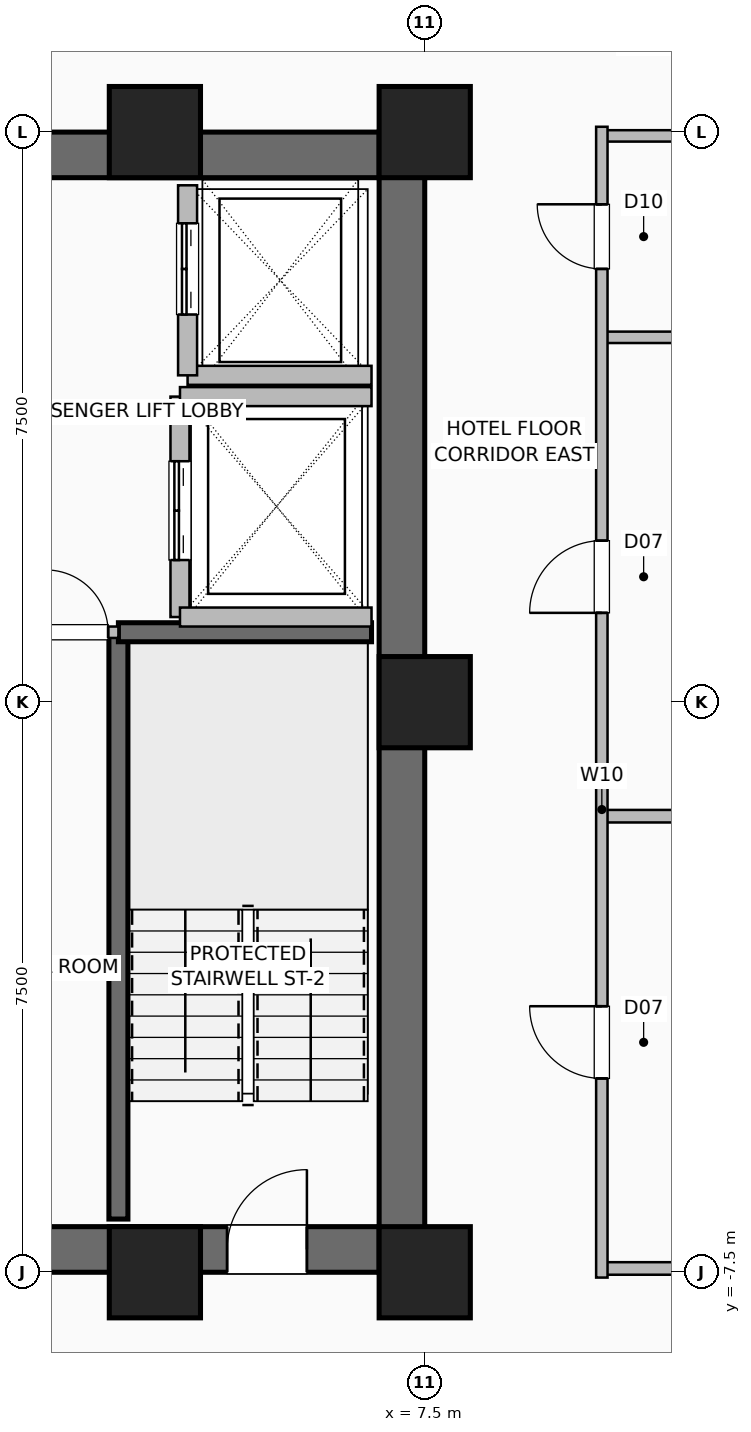
"""IFC4 building model, lengths in metres.
Left out: names, types, materials, properties, quantities, classifications, styles, units other than length and angle.
Written with IfcOpenShell. Run it as: python <this file> out.ifc"""

import sys

from ifc_helpers import new_model, si_unit, direction, frame, frame_2d, origin, origin_2d, place, context, subcontext, project, spatial, rectangle, hollow_rectangle, extrude, element, fill, save


model = new_model("IFC4")
c1 = context("Model", 3, precision=1e-05, world=origin(), true_north=direction((0.0, 1.0)))
c2 = subcontext(c1, "Body", "Model", "MODEL_VIEW")
j1 = project(units=[si_unit("LENGTHUNIT", "METRE"), si_unit("PLANEANGLEUNIT", "RADIAN")], contexts=[c1])
p1 = place(None, origin())
s1 = spatial("IfcSite", under=j1, at=p1, CompositionType="ELEMENT")
p2 = place(p1, origin())
s2 = spatial("IfcBuilding", under=s1, at=p2, CompositionType="ELEMENT")
p3 = place(p2, frame((0.0, 0.0, 62.0)))
s3 = spatial("IfcBuildingStorey", under=s2, at=p3, CompositionType="ELEMENT", Elevation=62.0)
for number, where, z_axis, x_axis in (
    (1, (3.95, -7.5, 0.0), (0.0, 0.0, 1.0), (1.0, 0.0, 0.0)),
    (2, (7.5, -7.5, 0.0), (0.0, 0.0, 1.0), (1.0, 0.0, 0.0)),
    (3, (7.5, 0.0, 0.0), (0.0, 0.0, 1.0), (1.0, 0.0, 0.0)),
    (4, (7.5, 7.5, 0.0), (0.0, 0.0, 1.0), (1.0, 0.0, 0.0)),
    (5, (3.95, 7.5, 0.0), (0.0, 0.0, 1.0), (1.0, 0.0, 0.0)),
):
    element("IfcColumn", number, at=place(p3, frame(where, z_axis=z_axis, x_axis=x_axis)), inside=s3, PredefinedType="COLUMN", context=c2, shape_type="SweptSolid", body=[
        extrude(hollow_rectangle(XDim=1.2, YDim=1.2, WallThickness=0.055, at=origin_2d()), origin(), (0.0, 0.0, 1.0), 3.5),
    ])
p4 = place(p3, frame((-7.5, -7.2, 0.0), z_axis=(0.0, 0.0, 1.0), x_axis=(1.0, 0.0, 0.0)))
e6 = element("IfcWall", 6, at=p4, inside=s3, PredefinedType="SHEAR", context=c2, shape_type="SweptSolid", body=[
    extrude(rectangle(XDim=15.0, YDim=0.6, at=frame_2d((7.5, 0.0))), origin(), (0.0, 0.0, 1.0), 3.25),
])
p5 = place(p4, frame((1.55, 0.0, 0.0)))
e7 = element("IfcOpeningElement", 7, at=p5, cuts=e6, PredefinedType="OPENING", context=c2, shape_type="SweptSolid", body=[
    extrude(rectangle(XDim=1.05, YDim=2.08, at=frame_2d((0.525, 1.04))), frame((0.0, 0.31, 0.0), z_axis=(0.0, -1.0, 0.0), x_axis=(1.0, 0.0, 0.0)), (0.0, 0.0, 1.0), 0.62),
])
p6 = place(p4, frame((12.4, 0.0, 0.0)))
e8 = element("IfcOpeningElement", 8, at=p6, cuts=e6, PredefinedType="OPENING", context=c2, shape_type="SweptSolid", body=[
    extrude(rectangle(XDim=1.05, YDim=2.08, at=frame_2d((0.525, 1.04))), frame((0.0, 0.31, 0.0), z_axis=(0.0, -1.0, 0.0), x_axis=(1.0, 0.0, 0.0)), (0.0, 0.0, 1.0), 0.62),
])
p7 = place(p4, frame((4.64, 0.0, 0.0)))
e9 = element("IfcOpeningElement", 9, at=p7, cuts=e6, PredefinedType="OPENING", context=c2, shape_type="SweptSolid", body=[
    extrude(rectangle(XDim=1.1, YDim=2.2, at=frame_2d((0.55, 1.1))), frame((0.0, 0.31, 0.0), z_axis=(0.0, -1.0, 0.0), x_axis=(1.0, 0.0, 0.0)), (0.0, 0.0, 1.0), 0.62),
])
p8 = place(p4, frame((6.52, 0.0, 0.0)))
e10 = element("IfcOpeningElement", 10, at=p8, cuts=e6, PredefinedType="OPENING", context=c2, shape_type="SweptSolid", body=[
    extrude(rectangle(XDim=1.1, YDim=2.2, at=frame_2d((0.55, 1.1))), frame((0.0, 0.31, 0.0), z_axis=(0.0, -1.0, 0.0), x_axis=(1.0, 0.0, 0.0)), (0.0, 0.0, 1.0), 0.62),
])
p9 = place(p4, frame((8.4, 0.0, 0.0)))
e11 = element("IfcOpeningElement", 11, at=p9, cuts=e6, PredefinedType="OPENING", context=c2, shape_type="SweptSolid", body=[
    extrude(rectangle(XDim=1.1, YDim=2.2, at=frame_2d((0.55, 1.1))), frame((0.0, 0.31, 0.0), z_axis=(0.0, -1.0, 0.0), x_axis=(1.0, 0.0, 0.0)), (0.0, 0.0, 1.0), 0.62),
])
for number, where, z_axis, x_axis in (
    (12, (-7.5, 7.2, 0.0), (0.0, 0.0, 1.0), (1.0, 0.0, 0.0)),
    (13, (7.2, -7.5, 0.0), (0.0, 0.0, 1.0), (0.0, 1.0, 0.0)),
):
    element("IfcWall", number, at=place(p3, frame(where, z_axis=z_axis, x_axis=x_axis)), inside=s3, PredefinedType="SHEAR", context=c2, shape_type="SweptSolid", body=[
        extrude(rectangle(XDim=15.0, YDim=0.6, at=frame_2d((7.5, 0.0))), origin(), (0.0, 0.0, 1.0), 3.25),
    ])
p10 = place(p3, frame((3.47, -6.8, 0.0), z_axis=(0.0, 0.0, 1.0), x_axis=(0.0, 1.0, 0.0)))
e14 = element("IfcWall", 14, at=p10, inside=s3, PredefinedType="SHEAR", context=c2, shape_type="SweptSolid", body=[
    extrude(rectangle(XDim=7.72, YDim=0.25, at=frame_2d((3.86, 0.0))), origin(), (0.0, 0.0, 1.0), 3.25),
])
p11 = place(p3, frame((3.47, 0.92, 0.0), z_axis=(0.0, 0.0, 1.0), x_axis=(1.0, 0.0, 0.0)))
e15 = element("IfcWall", 15, at=p11, inside=s3, PredefinedType="SHEAR", context=c2, shape_type="SweptSolid", body=[
    extrude(rectangle(XDim=3.33, YDim=0.25, at=frame_2d((1.665, 0.0))), origin(), (0.0, 0.0, 1.0), 3.25),
])
p12 = place(p3, frame((4.38, 4.3, 0.0), z_axis=(0.0, 0.0, 1.0), x_axis=(1.0, 0.0, 0.0)))
e16 = element("IfcWall", 16, at=p12, inside=s3, PredefinedType="SHEAR", context=c2, shape_type="SweptSolid", body=[
    extrude(rectangle(XDim=2.42, YDim=0.25, at=frame_2d((1.21, 0.0))), origin(), (0.0, 0.0, 1.0), 3.25),
])
p13 = place(p3, frame((4.38, 4.3, 0.0), z_axis=(0.0, 0.0, 1.0), x_axis=(0.0, 1.0, 0.0)))
e17 = element("IfcWall", 17, at=p13, inside=s3, PredefinedType="SHEAR", context=c2, shape_type="SweptSolid", body=[
    extrude(rectangle(XDim=2.5, YDim=0.25, at=frame_2d((1.25, 0.0))), origin(), (0.0, 0.0, 1.0), 3.25),
])
p14 = place(p13, frame((0.8, 0.0, 0.0)))
e18 = element("IfcOpeningElement", 18, at=p14, cuts=e17, PredefinedType="OPENING", context=c2, shape_type="SweptSolid", body=[
    extrude(rectangle(XDim=1.2, YDim=2.2, at=frame_2d((0.6, 1.1))), frame((0.0, 0.135, 0.0), z_axis=(0.0, -1.0, 0.0), x_axis=(1.0, 0.0, 0.0)), (0.0, 0.0, 1.0), 0.27),
])
p15 = place(p3, frame((4.28, 1.12, 0.0), z_axis=(0.0, 0.0, 1.0), x_axis=(0.0, 1.0, 0.0)))
e19 = element("IfcWall", 19, at=p15, inside=s3, PredefinedType="SHEAR", context=c2, shape_type="SweptSolid", body=[
    extrude(rectangle(XDim=2.9, YDim=0.25, at=frame_2d((1.45, 0.0))), origin(), (0.0, 0.0, 1.0), 3.25),
])
p16 = place(p15, frame((0.75, 0.0, 0.0)))
e20 = element("IfcOpeningElement", 20, at=p16, cuts=e19, PredefinedType="OPENING", context=c2, shape_type="SweptSolid", body=[
    extrude(rectangle(XDim=1.3, YDim=2.3, at=frame_2d((0.65, 1.15))), frame((0.0, 0.135, 0.0), z_axis=(0.0, -1.0, 0.0), x_axis=(1.0, 0.0, 0.0)), (0.0, 0.0, 1.0), 0.27),
])
for number, where, z_axis, x_axis in (
    (21, (4.28, 1.12, 0.0), (0.0, 0.0, 1.0), (1.0, 0.0, 0.0)),
    (22, (4.28, 4.02, 0.0), (0.0, 0.0, 1.0), (1.0, 0.0, 0.0)),
):
    element("IfcWall", number, at=place(p3, frame(where, z_axis=z_axis, x_axis=x_axis)), inside=s3, PredefinedType="SHEAR", context=c2, shape_type="SweptSolid", body=[
        extrude(rectangle(XDim=2.52, YDim=0.25, at=frame_2d((1.26, 0.0))), origin(), (0.0, 0.0, 1.0), 3.25),
    ])
p17 = place(p3, frame((2.38, 0.92, 0.0), z_axis=(0.0, 0.0, 1.0), x_axis=(1.0, 0.0, 0.0)))
e23 = element("IfcWall", 23, at=p17, inside=s3, PredefinedType="PARTITIONING", context=c2, shape_type="SweptSolid", body=[
    extrude(rectangle(XDim=1.09, YDim=0.15, at=frame_2d((0.545, 0.0))), origin(), (0.0, 0.0, 1.0), 3.25),
])
p18 = place(p17, frame((0.135, 0.0, 0.0)))
e24 = element("IfcOpeningElement", 24, at=p18, cuts=e23, PredefinedType="OPENING", context=c2, shape_type="SweptSolid", body=[
    extrude(rectangle(XDim=0.82, YDim=2.05, at=frame_2d((0.41, 1.025))), frame((0.0, 0.085, 0.0), z_axis=(0.0, -1.0, 0.0), x_axis=(1.0, 0.0, 0.0)), (0.0, 0.0, 1.0), 0.17),
])
for number, where, z_axis, x_axis in (
    (25, (9.83, -7.45, 0.0), (0.0, 0.0, 1.0), (1.0, 0.0, 0.0)),
    (26, (9.83, -1.5, 0.0), (0.0, 0.0, 1.0), (1.0, 0.0, 0.0)),
):
    element("IfcWall", number, at=place(p3, frame(where, z_axis=z_axis, x_axis=x_axis)), inside=s3, PredefinedType="PLUMBINGWALL", context=c2, shape_type="SweptSolid", body=[
        extrude(rectangle(XDim=13.99, YDim=0.165, at=frame_2d((6.995, 0.0))), origin(), (0.0, 0.0, 1.0), 3.25),
    ])
p19 = place(p3, frame((9.83, 4.8, 0.0), z_axis=(0.0, 0.0, 1.0), x_axis=(1.0, 0.0, 0.0)))
e27 = element("IfcWall", 27, at=p19, inside=s3, PredefinedType="PARTITIONING", context=c2, shape_type="SweptSolid", body=[
    extrude(rectangle(XDim=13.99, YDim=0.15, at=frame_2d((6.995, 0.0))), origin(), (0.0, 0.0, 1.0), 2.818),
])
p20 = place(p3, frame((9.83, 7.45, 0.0), z_axis=(0.0, 0.0, 1.0), x_axis=(1.0, 0.0, 0.0)))
e28 = element("IfcWall", 28, at=p20, inside=s3, PredefinedType="PARTITIONING", context=c2, shape_type="SweptSolid", body=[
    extrude(rectangle(XDim=13.99, YDim=0.15, at=frame_2d((6.995, 0.0))), origin(), (0.0, 0.0, 1.0), 3.25),
])
p21 = place(p3, frame((9.83, -7.57, 0.0), z_axis=(0.0, 0.0, 1.0), x_axis=(0.0, 1.0, 0.0)))
e29 = element("IfcWall", 29, at=p21, inside=s3, PredefinedType="PARTITIONING", context=c2, shape_type="SweptSolid", body=[
    extrude(rectangle(XDim=15.14, YDim=0.15, at=frame_2d((7.57, 0.0))), origin(), (0.0, 0.0, 1.0), 3.25),
])
p22 = place(p21, frame((2.62, 0.0, 0.0)))
e30 = element("IfcOpeningElement", 30, at=p22, cuts=e29, PredefinedType="OPENING", context=c2, shape_type="SweptSolid", body=[
    extrude(rectangle(XDim=0.95, YDim=2.06, at=frame_2d((0.475, 1.03))), frame((0.0, 0.085, 0.0), z_axis=(0.0, -1.0, 0.0), x_axis=(1.0, 0.0, 0.0)), (0.0, 0.0, 1.0), 0.17),
])
p23 = place(p21, frame((8.745, 0.0, 0.0)))
e31 = element("IfcOpeningElement", 31, at=p23, cuts=e29, PredefinedType="OPENING", context=c2, shape_type="SweptSolid", body=[
    extrude(rectangle(XDim=0.95, YDim=2.06, at=frame_2d((0.475, 1.03))), frame((0.0, 0.085, 0.0), z_axis=(0.0, -1.0, 0.0), x_axis=(1.0, 0.0, 0.0)), (0.0, 0.0, 1.0), 0.17),
])
p24 = place(p21, frame((13.27, 0.0, 0.0)))
e32 = element("IfcOpeningElement", 32, at=p24, cuts=e29, PredefinedType="OPENING", context=c2, shape_type="SweptSolid", body=[
    extrude(rectangle(XDim=0.85, YDim=2.05, at=frame_2d((0.425, 1.025))), frame((0.0, 0.085, 0.0), z_axis=(0.0, -1.0, 0.0), x_axis=(1.0, 0.0, 0.0)), (0.0, 0.0, 1.0), 0.17),
])
p25 = place(p6, origin())
e33 = element("IfcDoor", 33, at=p25, inside=s3, OperationType="SINGLE_SWING_RIGHT", PredefinedType="DOOR", context=c2, shape_type="SweptSolid", body=[
    extrude(rectangle(XDim=1.05, YDim=2.08, at=frame_2d((0.525, 1.04))), frame((0.0, 0.025, 0.0), z_axis=(0.0, -1.0, 0.0), x_axis=(1.0, 0.0, 0.0)), (0.0, 0.0, 1.0), 0.05),
])
fill(e8, e33)
p26 = place(p14, origin())
e34 = element("IfcDoor", 34, at=p26, inside=s3, OperationType="DOUBLE_DOOR_SLIDING", PredefinedType="DOOR", context=c2, shape_type="SweptSolid", body=[
    extrude(rectangle(XDim=1.2, YDim=2.2, at=frame_2d((0.6, 1.1))), frame((0.0, 0.025, 0.0), z_axis=(0.0, -1.0, 0.0), x_axis=(1.0, 0.0, 0.0)), (0.0, 0.0, 1.0), 0.05),
])
fill(e18, e34)
p27 = place(p16, origin())
e35 = element("IfcDoor", 35, at=p27, inside=s3, OperationType="DOUBLE_DOOR_SLIDING", PredefinedType="DOOR", context=c2, shape_type="SweptSolid", body=[
    extrude(rectangle(XDim=1.3, YDim=2.3, at=frame_2d((0.65, 1.15))), frame((0.0, 0.025, 0.0), z_axis=(0.0, -1.0, 0.0), x_axis=(1.0, 0.0, 0.0)), (0.0, 0.0, 1.0), 0.05),
])
fill(e20, e35)
p28 = place(p18, origin())
e36 = element("IfcDoor", 36, at=p28, inside=s3, OperationType="SINGLE_SWING_LEFT", PredefinedType="DOOR", context=c2, shape_type="SweptSolid", body=[
    extrude(rectangle(XDim=0.82, YDim=2.05, at=frame_2d((0.41, 1.025))), frame((0.0, 0.025, 0.0), z_axis=(0.0, -1.0, 0.0), x_axis=(1.0, 0.0, 0.0)), (0.0, 0.0, 1.0), 0.05),
])
fill(e24, e36)
p29 = place(p22, origin())
e37 = element("IfcDoor", 37, at=p29, inside=s3, OperationType="SINGLE_SWING_RIGHT", PredefinedType="DOOR", context=c2, shape_type="SweptSolid", body=[
    extrude(rectangle(XDim=0.95, YDim=2.06, at=frame_2d((0.475, 1.03))), frame((0.0, 0.025, 0.0), z_axis=(0.0, -1.0, 0.0), x_axis=(1.0, 0.0, 0.0)), (0.0, 0.0, 1.0), 0.05),
])
fill(e30, e37)
p30 = place(p23, origin())
e38 = element("IfcDoor", 38, at=p30, inside=s3, OperationType="SINGLE_SWING_LEFT", PredefinedType="DOOR", context=c2, shape_type="SweptSolid", body=[
    extrude(rectangle(XDim=0.95, YDim=2.06, at=frame_2d((0.475, 1.03))), frame((0.0, 0.025, 0.0), z_axis=(0.0, -1.0, 0.0), x_axis=(1.0, 0.0, 0.0)), (0.0, 0.0, 1.0), 0.05),
])
fill(e31, e38)
p31 = place(p24, origin())
e39 = element("IfcDoor", 39, at=p31, inside=s3, OperationType="SINGLE_SWING_RIGHT", PredefinedType="DOOR", context=c2, shape_type="SweptSolid", body=[
    extrude(rectangle(XDim=0.85, YDim=2.05, at=frame_2d((0.425, 1.025))), frame((0.0, 0.025, 0.0), z_axis=(0.0, -1.0, 0.0), x_axis=(1.0, 0.0, 0.0)), (0.0, 0.0, 1.0), 0.05),
])
fill(e32, e39)
save(model, sys.argv[1])
